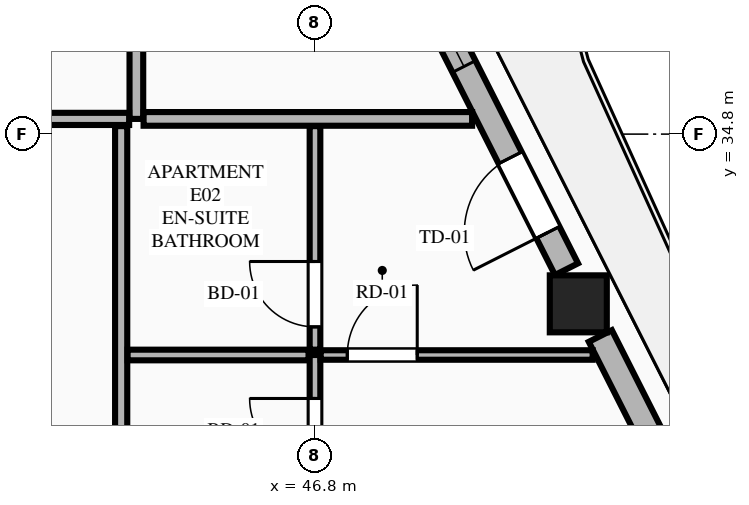
"""IFC4 building model, lengths in metres.
Left out: names, types, materials, properties, quantities, classifications, styles, units other than length and angle.
Written with IfcOpenShell. Run it as: python <this file> out.ifc"""

import sys

from ifc_helpers import new_model, si_unit, direction, frame, frame_2d, origin, origin_2d, place, context, subcontext, project, spatial, rectangle, extrude, element, fill, save


model = new_model("IFC4")
c1 = context("Model", 3, precision=1e-05, world=origin(), true_north=direction((0.0, 1.0)))
c2 = subcontext(c1, "Body", "Model", "MODEL_VIEW")
j1 = project(units=[si_unit("LENGTHUNIT", "METRE"), si_unit("PLANEANGLEUNIT", "RADIAN")], contexts=[c1])
p1 = place(None, origin())
s1 = spatial("IfcSite", under=j1, at=p1, CompositionType="ELEMENT")
p2 = place(p1, origin())
s2 = spatial("IfcBuilding", under=s1, at=p2, CompositionType="ELEMENT")
p3 = place(p2, frame((0.0, 0.0, 256.2)))
s3 = spatial("IfcBuildingStorey", under=s2, at=p3, CompositionType="ELEMENT", Elevation=256.2)
p4 = place(p3, frame((50.264, 32.567, 0.0), z_axis=(0.0, 0.0, 1.0), x_axis=(1.0, 0.0, 0.0)))
e1 = element("IfcColumn", 1, at=p4, inside=s3, PredefinedType="COLUMN", context=c2, shape_type="SweptSolid", body=[
    extrude(rectangle(XDim=0.75, YDim=0.75, at=origin_2d()), origin(), (0.0, 0.0, 1.0), 3.65),
])
p5 = place(p3, frame((52.543, 28.211, 0.0), z_axis=(0.0, 0.0, 1.0), x_axis=(-0.451285866323, 0.892379441077, 0.0)))
e2 = element("IfcWall", 2, at=p5, inside=s3, PredefinedType="STANDARD", context=c2, shape_type="SweptSolid", body=[
    extrude(rectangle(XDim=4.407, YDim=0.34, at=frame_2d((2.204, 0.0))), origin(), (0.0, 0.0, 1.0), 2.983),
])
p6 = place(p5, frame((1.504, 0.0, 0.75)))
e3 = element("IfcOpeningElement", 3, at=p6, cuts=e2, PredefinedType="OPENING", context=c2, shape_type="SweptSolid", body=[
    extrude(rectangle(XDim=1.4, YDim=2.05, at=frame_2d((0.7, 1.025))), frame((0.0, 0.18, 0.0), z_axis=(0.0, -1.0, 0.0), x_axis=(1.0, 0.0, 0.0)), (0.0, 0.0, 1.0), 0.36),
])
p7 = place(p3, frame((50.109, 33.023, 0.0), z_axis=(0.0, 0.0, 1.0), x_axis=(-0.451539564999, 0.892251097641, 0.0)))
e4 = element("IfcWall", 4, at=p7, inside=s3, PredefinedType="STANDARD", context=c2, shape_type="SweptSolid", body=[
    extrude(rectangle(XDim=4.6, YDim=0.34, at=frame_2d((2.3, 0.0))), origin(), (0.0, 0.0, 1.0), 2.983),
])
p8 = place(p7, frame((0.542, 0.0, 0.0)))
e5 = element("IfcOpeningElement", 5, at=p8, cuts=e4, PredefinedType="OPENING", context=c2, shape_type="SweptSolid", body=[
    extrude(rectangle(XDim=1.1, YDim=2.25, at=frame_2d((0.55, 1.125))), frame((0.0, 0.18, 0.0), z_axis=(0.0, -1.0, 0.0), x_axis=(1.0, 0.0, 0.0)), (0.0, 0.0, 1.0), 0.36),
])
p9 = place(p7, frame((2.988, 0.0, 0.75)))
e6 = element("IfcOpeningElement", 6, at=p9, cuts=e4, PredefinedType="OPENING", context=c2, shape_type="SweptSolid", body=[
    extrude(rectangle(XDim=1.1, YDim=2.0, at=frame_2d((0.55, 1.0))), frame((0.0, 0.18, 0.0), z_axis=(0.0, -1.0, 0.0), x_axis=(1.0, 0.0, 0.0)), (0.0, 0.0, 1.0), 0.36),
])
p10 = place(p3, frame((44.45, 35.0, 0.0), z_axis=(0.0, 0.0, 1.0), x_axis=(0.0, 1.0, 0.0)))
e7 = element("IfcWall", 7, at=p10, inside=s3, PredefinedType="PARTITIONING", context=c2, shape_type="SweptSolid", body=[
    extrude(rectangle(XDim=8.481, YDim=0.18, at=frame_2d((4.24, 0.0))), origin(), (0.0, 0.0, 1.0), 3.45),
])
p11 = place(p3, frame((35.749, 35.0, 0.0), z_axis=(0.0, 0.0, 1.0), x_axis=(1.0, 0.0, 0.0)))
e8 = element("IfcWall", 8, at=p11, inside=s3, PredefinedType="PARTITIONING", context=c2, shape_type="SweptSolid", body=[
    extrude(rectangle(XDim=8.606, YDim=0.16, at=frame_2d((4.303, 0.0))), origin(), (0.0, 0.0, 1.0), 3.45),
])
p12 = place(p11, frame((6.351, 0.0, 0.0)))
e9 = element("IfcOpeningElement", 9, at=p12, cuts=e8, PredefinedType="OPENING", context=c2, shape_type="SweptSolid", body=[
    extrude(rectangle(XDim=1.02, YDim=2.25, at=frame_2d((0.51, 1.125))), frame((0.0, 0.09, 0.0), z_axis=(0.0, -1.0, 0.0), x_axis=(1.0, 0.0, 0.0)), (0.0, 0.0, 1.0), 0.18),
])
p13 = place(p3, frame((44.545, 35.0, 0.0), z_axis=(0.0, 0.0, 1.0), x_axis=(1.0, 0.0, 0.0)))
e10 = element("IfcWall", 10, at=p13, inside=s3, PredefinedType="PARTITIONING", context=c2, shape_type="SweptSolid", body=[
    extrude(rectangle(XDim=4.322, YDim=0.18, at=frame_2d((2.161, 0.0))), origin(), (0.0, 0.0, 1.0), 3.45),
])
p14 = place(p3, frame((44.25, 26.539, 0.0), z_axis=(0.0, 0.0, 1.0), x_axis=(0.0, 1.0, 0.0)))
e11 = element("IfcWall", 11, at=p14, inside=s3, PredefinedType="PARTITIONING", context=c2, shape_type="SweptSolid", body=[
    extrude(rectangle(XDim=8.366, YDim=0.16, at=frame_2d((4.183, 0.0))), origin(), (0.0, 0.0, 1.0), 3.137),
])
p15 = place(p14, frame((0.45, 0.0, 0.0)))
e12 = element("IfcOpeningElement", 12, at=p15, cuts=e11, PredefinedType="OPENING", context=c2, shape_type="SweptSolid", body=[
    extrude(rectangle(XDim=1.02, YDim=2.25, at=frame_2d((0.51, 1.125))), frame((0.0, 0.09, 0.0), z_axis=(0.0, -1.0, 0.0), x_axis=(1.0, 0.0, 0.0)), (0.0, 0.0, 1.0), 0.18),
])
p16 = place(p3, frame((46.8, 28.494, 0.0), z_axis=(0.0, 0.0, 1.0), x_axis=(0.0, 1.0, 0.0)))
e13 = element("IfcWall", 13, at=p16, inside=s3, PredefinedType="PLUMBINGWALL", context=c2, shape_type="SweptSolid", body=[
    extrude(rectangle(XDim=3.4, YDim=0.14, at=frame_2d((1.7, 0.0))), origin(), (0.0, 0.0, 1.0), 3.45),
])
p17 = place(p16, frame((0.2, 0.0, 0.0)))
e14 = element("IfcOpeningElement", 14, at=p17, cuts=e13, PredefinedType="OPENING", context=c2, shape_type="SweptSolid", body=[
    extrude(rectangle(XDim=0.88, YDim=2.15, at=frame_2d((0.44, 1.075))), frame((0.0, 0.08, 0.0), z_axis=(0.0, -1.0, 0.0), x_axis=(1.0, 0.0, 0.0)), (0.0, 0.0, 1.0), 0.16),
])
p18 = place(p16, frame((1.968, 0.0, 0.0)))
e15 = element("IfcOpeningElement", 15, at=p18, cuts=e13, PredefinedType="OPENING", context=c2, shape_type="SweptSolid", body=[
    extrude(rectangle(XDim=0.86, YDim=2.1, at=frame_2d((0.43, 1.05))), frame((0.0, 0.08, 0.0), z_axis=(0.0, -1.0, 0.0), x_axis=(1.0, 0.0, 0.0)), (0.0, 0.0, 1.0), 0.16),
])
p19 = place(p3, frame((46.8, 31.964, 0.0), z_axis=(0.0, 0.0, 1.0), x_axis=(0.0, 1.0, 0.0)))
e16 = element("IfcWall", 16, at=p19, inside=s3, PredefinedType="PLUMBINGWALL", context=c2, shape_type="SweptSolid", body=[
    extrude(rectangle(XDim=2.941, YDim=0.14, at=frame_2d((1.47, 0.0))), origin(), (0.0, 0.0, 1.0), 3.45),
])
p20 = place(p19, frame((0.3, 0.0, 0.0)))
e17 = element("IfcOpeningElement", 17, at=p20, cuts=e16, PredefinedType="OPENING", context=c2, shape_type="SweptSolid", body=[
    extrude(rectangle(XDim=0.86, YDim=2.1, at=frame_2d((0.43, 1.05))), frame((0.0, 0.08, 0.0), z_axis=(0.0, -1.0, 0.0), x_axis=(1.0, 0.0, 0.0)), (0.0, 0.0, 1.0), 0.16),
])
p21 = place(p3, frame((44.335, 31.894, 0.0), z_axis=(0.0, 0.0, 1.0), x_axis=(1.0, 0.0, 0.0)))
e18 = element("IfcWall", 18, at=p21, inside=s3, PredefinedType="PLUMBINGWALL", context=c2, shape_type="SweptSolid", body=[
    extrude(rectangle(XDim=2.38, YDim=0.14, at=frame_2d((1.19, 0.0))), origin(), (0.0, 0.0, 1.0), 3.45),
])
p22 = place(p3, frame((46.875, 31.894, 0.0), z_axis=(0.0, 0.0, 1.0), x_axis=(1.0, 0.0, 0.0)))
e19 = element("IfcWall", 19, at=p22, inside=s3, PredefinedType="PARTITIONING", context=c2, shape_type="SweptSolid", body=[
    extrude(rectangle(XDim=3.578, YDim=0.125, at=frame_2d((1.789, 0.0))), origin(), (0.0, 0.0, 1.0), 3.45),
])
p23 = place(p22, frame((0.35, 0.0, 0.0)))
e20 = element("IfcOpeningElement", 20, at=p23, cuts=e19, PredefinedType="OPENING", context=c2, shape_type="SweptSolid", body=[
    extrude(rectangle(XDim=0.92, YDim=2.15, at=frame_2d((0.46, 1.075))), frame((0.0, 0.073, 0.0), z_axis=(0.0, -1.0, 0.0), x_axis=(1.0, 0.0, 0.0)), (0.0, 0.0, 1.0), 0.145),
])
p24 = place(p8, origin())
e21 = element("IfcDoor", 21, at=p24, inside=s3, OperationType="SINGLE_SWING_LEFT", PredefinedType="DOOR", context=c2, shape_type="SweptSolid", body=[
    extrude(rectangle(XDim=1.1, YDim=2.25, at=frame_2d((0.55, 1.125))), frame((0.0, 0.025, 0.0), z_axis=(0.0, -1.0, 0.0), x_axis=(1.0, 0.0, 0.0)), (0.0, 0.0, 1.0), 0.05),
])
fill(e5, e21)
p25 = place(p18, origin())
e22 = element("IfcDoor", 22, at=p25, inside=s3, OperationType="SINGLE_SWING_RIGHT", PredefinedType="DOOR", context=c2, shape_type="SweptSolid", body=[
    extrude(rectangle(XDim=0.86, YDim=2.1, at=frame_2d((0.43, 1.05))), frame((0.0, 0.025, 0.0), z_axis=(0.0, -1.0, 0.0), x_axis=(1.0, 0.0, 0.0)), (0.0, 0.0, 1.0), 0.05),
])
fill(e15, e22)
p26 = place(p20, origin())
e23 = element("IfcDoor", 23, at=p26, inside=s3, OperationType="SINGLE_SWING_RIGHT", PredefinedType="DOOR", context=c2, shape_type="SweptSolid", body=[
    extrude(rectangle(XDim=0.86, YDim=2.1, at=frame_2d((0.43, 1.05))), frame((0.0, 0.025, 0.0), z_axis=(0.0, -1.0, 0.0), x_axis=(1.0, 0.0, 0.0)), (0.0, 0.0, 1.0), 0.05),
])
fill(e17, e23)
p27 = place(p23, origin())
e24 = element("IfcDoor", 24, at=p27, inside=s3, OperationType="SINGLE_SWING_RIGHT", PredefinedType="DOOR", context=c2, shape_type="SweptSolid", body=[
    extrude(rectangle(XDim=0.92, YDim=2.15, at=frame_2d((0.46, 1.075))), frame((0.0, 0.025, 0.0), z_axis=(0.0, -1.0, 0.0), x_axis=(1.0, 0.0, 0.0)), (0.0, 0.0, 1.0), 0.05),
])
fill(e20, e24)
p28 = place(p9, origin())
e25 = element("IfcWindow", 25, at=p28, inside=s3, PartitioningType="SINGLE_PANEL", PredefinedType="WINDOW", context=c2, shape_type="SweptSolid", body=[
    extrude(rectangle(XDim=1.1, YDim=2.0, at=frame_2d((0.55, 1.0))), frame((0.0, 0.03, 0.0), z_axis=(0.0, -1.0, 0.0), x_axis=(1.0, 0.0, 0.0)), (0.0, 0.0, 1.0), 0.06),
])
fill(e6, e25)
save(model, sys.argv[1])
